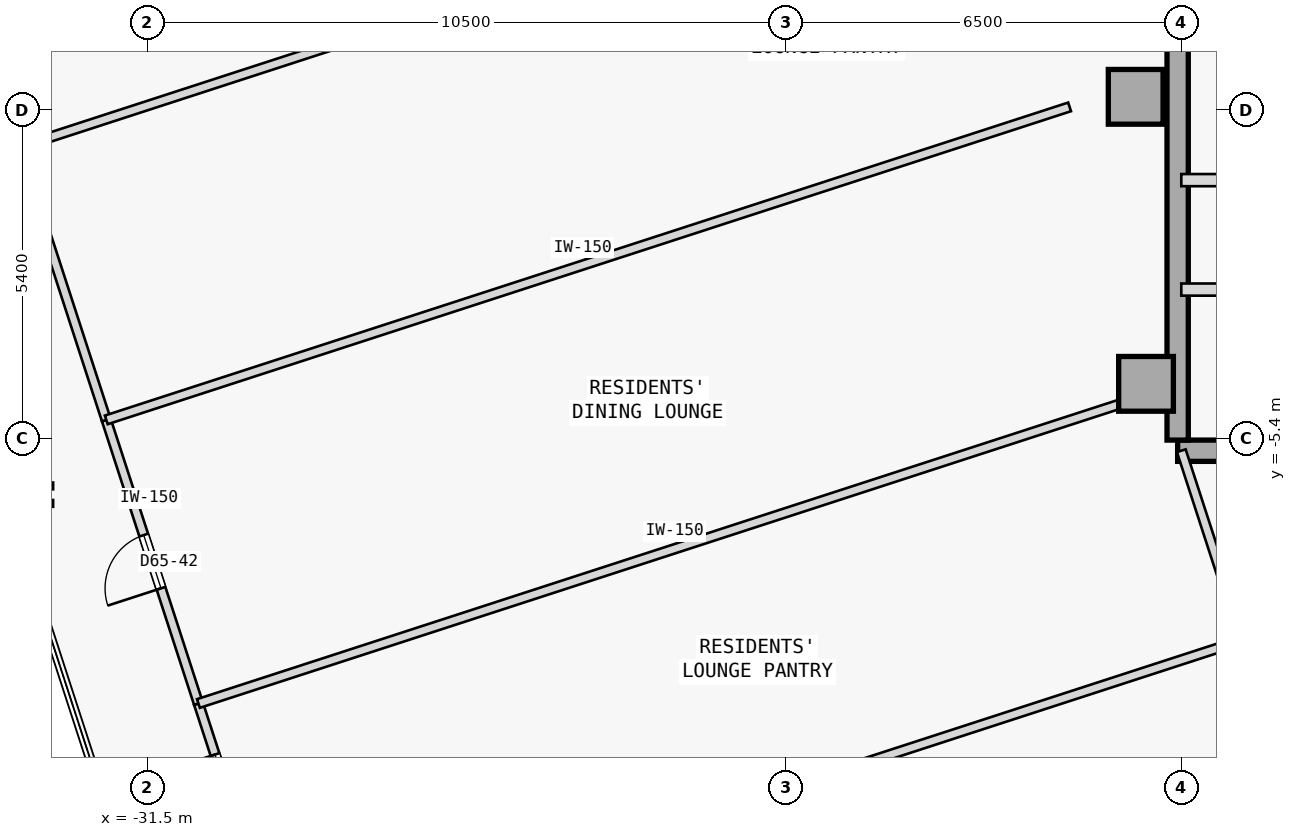
"""IFC4 building model, lengths in metres.
Left out: names, types, materials, properties, quantities, classifications, styles, units other than length and angle.
Written with IfcOpenShell. Run it as: python <this file> out.ifc"""

import sys

from ifc_helpers import new_model, si_unit, direction, frame, frame_2d, origin, origin_2d, place, context, subcontext, project, spatial, rectangle, extrude, element, fill, save


model = new_model("IFC4")
c1 = context("Model", 3, precision=1e-05, world=origin(), true_north=direction((0.0, 1.0)))
c2 = subcontext(c1, "Body", "Model", "MODEL_VIEW")
j1 = project(units=[si_unit("LENGTHUNIT", "METRE"), si_unit("PLANEANGLEUNIT", "RADIAN")], contexts=[c1])
p1 = place(None, origin())
s1 = spatial("IfcSite", under=j1, at=p1, CompositionType="ELEMENT")
p2 = place(p1, origin())
s2 = spatial("IfcBuilding", under=s1, at=p2, CompositionType="ELEMENT")
p3 = place(p2, frame((0.0, 0.0, 244.4)))
s3 = spatial("IfcBuildingStorey", under=s2, at=p3, CompositionType="ELEMENT", Elevation=244.4)
for number, where, z_axis, x_axis in (
    (1, (-15.25, 0.22, 0.0), (0.0, 0.0, 1.0), (1.0, 0.0, 0.0)),
    (2, (-15.08, -4.5, 0.0), (0.0, 0.0, 1.0), (1.0, 0.0, 0.0)),
):
    element("IfcColumn", number, at=place(p3, frame(where, z_axis=z_axis, x_axis=x_axis)), inside=s3, PredefinedType="COLUMN", context=c2, shape_type="SweptSolid", body=[
        extrude(rectangle(XDim=0.9, YDim=0.9, at=origin_2d()), origin(), (0.0, 0.0, 1.0), 3.35),
    ])
p4 = place(p3, frame((-14.56, -5.6, 0.0), z_axis=(0.0, 0.0, 1.0), x_axis=(1.0, 0.0, 0.0)))
e3 = element("IfcWall", 3, at=p4, inside=s3, PredefinedType="SHEAR", context=c2, shape_type="SweptSolid", body=[
    extrude(rectangle(XDim=10.86, YDim=0.35, at=frame_2d((5.43, 0.0))), origin(), (0.0, 0.0, 1.0), 3.125),
])
p5 = place(p3, frame((-14.56, -5.425, 0.0), z_axis=(0.0, 0.0, 1.0), x_axis=(0.0, 1.0, 0.0)))
e4 = element("IfcWall", 4, at=p5, inside=s3, PredefinedType="SHEAR", context=c2, shape_type="SweptSolid", body=[
    extrude(rectangle(XDim=10.85, YDim=0.35, at=frame_2d((5.425, 0.0))), origin(), (0.0, 0.0, 1.0), 3.125),
])
p6 = place(p3, frame((-14.5, -1.15, 0.0), z_axis=(0.0, 0.0, 1.0), x_axis=(1.0, 0.0, 0.0)))
e5 = element("IfcWall", 5, at=p6, inside=s3, PredefinedType="STANDARD", context=c2, shape_type="SweptSolid", body=[
    extrude(rectangle(XDim=2.95, YDim=0.2, at=frame_2d((1.475, 0.0))), origin(), (0.0, 0.0, 1.0), 3.125),
])
p7 = place(p6, frame((0.75, 0.0, 0.0)))
e6 = element("IfcOpeningElement", 6, at=p7, cuts=e5, PredefinedType="OPENING", context=c2, shape_type="SweptSolid", body=[
    extrude(rectangle(XDim=1.05, YDim=2.18, at=frame_2d((0.525, 1.09))), frame((0.0, 0.11, 0.0), z_axis=(0.0, -1.0, 0.0), x_axis=(1.0, 0.0, 0.0)), (0.0, 0.0, 1.0), 0.22),
])
p8 = place(p3, frame((-14.5, -2.95, 0.0), z_axis=(0.0, 0.0, 1.0), x_axis=(1.0, 0.0, 0.0)))
e7 = element("IfcWall", 7, at=p8, inside=s3, PredefinedType="STANDARD", context=c2, shape_type="SweptSolid", body=[
    extrude(rectangle(XDim=10.8, YDim=0.2, at=frame_2d((5.4, 0.0))), origin(), (0.0, 0.0, 1.0), 3.125),
])
p9 = place(p8, frame((9.17, 0.0, 0.0)))
e8 = element("IfcOpeningElement", 8, at=p9, cuts=e7, PredefinedType="OPENING", context=c2, shape_type="SweptSolid", body=[
    extrude(rectangle(XDim=1.1, YDim=2.15, at=frame_2d((0.55, 1.075))), frame((0.0, 0.11, 0.0), z_axis=(0.0, -1.0, 0.0), x_axis=(1.0, 0.0, 0.0)), (0.0, 0.0, 1.0), 0.22),
])
p10 = place(p8, frame((2.33, 0.0, 0.0)))
e9 = element("IfcOpeningElement", 9, at=p10, cuts=e7, PredefinedType="OPENING", context=c2, shape_type="SweptSolid", body=[
    extrude(rectangle(XDim=0.92, YDim=2.15, at=frame_2d((0.46, 1.075))), frame((0.0, 0.11, 0.0), z_axis=(0.0, -1.0, 0.0), x_axis=(1.0, 0.0, 0.0)), (0.0, 0.0, 1.0), 0.22),
])
p11 = place(p8, frame((6.65, 0.0, 0.0)))
e10 = element("IfcOpeningElement", 10, at=p11, cuts=e7, PredefinedType="OPENING", context=c2, shape_type="SweptSolid", body=[
    extrude(rectangle(XDim=0.92, YDim=2.15, at=frame_2d((0.46, 1.075))), frame((0.0, 0.11, 0.0), z_axis=(0.0, -1.0, 0.0), x_axis=(1.0, 0.0, 0.0)), (0.0, 0.0, 1.0), 0.22),
])
p12 = place(p3, frame((-36.012, 0.314, 0.0), z_axis=(0.0, 0.0, 1.0), x_axis=(0.951071182868, 0.308971851659, 0.0)))
e11 = element("IfcWall", 11, at=p12, inside=s3, PredefinedType="PARTITIONING", context=c2, shape_type="SweptSolid", body=[
    extrude(rectangle(XDim=3.77, YDim=0.15, at=frame_2d((1.885, 0.0))), origin(), (0.0, 0.0, 1.0), 3.125),
])
p13 = place(p3, frame((-29.833, -12.311, 0.0), z_axis=(0.0, 0.0, 1.0), x_axis=(-0.309044953986, 0.951047431213, 0.0)))
e12 = element("IfcWall", 12, at=p13, inside=s3, PredefinedType="PARTITIONING", context=c2, shape_type="SweptSolid", body=[
    extrude(rectangle(XDim=2.685, YDim=0.15, at=frame_2d((1.343, 0.0))), origin(), (0.0, 0.0, 1.0), 3.125),
])
p14 = place(p13, frame((0.883, 0.0, 0.0)))
e13 = element("IfcOpeningElement", 13, at=p14, cuts=e12, PredefinedType="OPENING", context=c2, shape_type="SweptSolid", body=[
    extrude(rectangle(XDim=0.92, YDim=2.15, at=frame_2d((0.46, 1.075))), frame((0.0, 0.085, 0.0), z_axis=(0.0, -1.0, 0.0), x_axis=(1.0, 0.0, 0.0)), (0.0, 0.0, 1.0), 0.17),
])
p15 = place(p3, frame((-30.663, -9.757, 0.0), z_axis=(0.0, 0.0, 1.0), x_axis=(-0.309019653166, 0.951055652397, 0.0)))
e14 = element("IfcWall", 14, at=p15, inside=s3, PredefinedType="PARTITIONING", context=c2, shape_type="SweptSolid", body=[
    extrude(rectangle(XDim=4.904, YDim=0.15, at=frame_2d((2.452, 0.0))), origin(), (0.0, 0.0, 1.0), 3.125),
])
p16 = place(p15, frame((1.992, 0.0, 0.0)))
e15 = element("IfcOpeningElement", 15, at=p16, cuts=e14, PredefinedType="OPENING", context=c2, shape_type="SweptSolid", body=[
    extrude(rectangle(XDim=0.92, YDim=2.15, at=frame_2d((0.46, 1.075))), frame((0.0, 0.085, 0.0), z_axis=(0.0, -1.0, 0.0), x_axis=(1.0, 0.0, 0.0)), (0.0, 0.0, 1.0), 0.17),
])
p17 = place(p3, frame((-32.179, -5.093, 0.0), z_axis=(0.0, 0.0, 1.0), x_axis=(-0.309014532869, 0.951057316083, 0.0)))
e16 = element("IfcWall", 16, at=p17, inside=s3, PredefinedType="PARTITIONING", context=c2, shape_type="SweptSolid", body=[
    extrude(rectangle(XDim=4.707, YDim=0.15, at=frame_2d((2.354, 0.0))), origin(), (0.0, 0.0, 1.0), 3.125),
])
p18 = place(p3, frame((-33.633, -0.616, 0.0), z_axis=(0.0, 0.0, 1.0), x_axis=(0.951058192995, 0.309011833974, 0.0)))
e17 = element("IfcWall", 17, at=p18, inside=s3, PredefinedType="PARTITIONING", context=c2, shape_type="SweptSolid", body=[
    extrude(rectangle(XDim=16.657, YDim=0.15, at=frame_2d((8.329, 0.0))), origin(), (0.0, 0.0, 1.0), 3.125),
])
p19 = place(p18, frame((7.868, 0.0, 0.0)))
e18 = element("IfcOpeningElement", 18, at=p19, cuts=e17, PredefinedType="OPENING", context=c2, shape_type="SweptSolid", body=[
    extrude(rectangle(XDim=0.92, YDim=2.15, at=frame_2d((0.46, 1.075))), frame((0.0, 0.085, 0.0), z_axis=(0.0, -1.0, 0.0), x_axis=(1.0, 0.0, 0.0)), (0.0, 0.0, 1.0), 0.17),
])
p20 = place(p3, frame((-31.208, -14.471, 0.0), z_axis=(0.0, 0.0, 1.0), x_axis=(0.951057753948, 0.309013185244, 0.0)))
e19 = element("IfcWall", 19, at=p20, inside=s3, PredefinedType="PARTITIONING", context=c2, shape_type="SweptSolid", body=[
    extrude(rectangle(XDim=18.632, YDim=0.15, at=frame_2d((9.316, 0.0))), origin(), (0.0, 0.0, 1.0), 3.125),
])
p21 = place(p3, frame((-30.663, -9.757, 0.0), z_axis=(0.0, 0.0, 1.0), x_axis=(0.951058192995, 0.309011833974, 0.0)))
e20 = element("IfcWall", 20, at=p21, inside=s3, PredefinedType="PARTITIONING", context=c2, shape_type="SweptSolid", body=[
    extrude(rectangle(XDim=16.657, YDim=0.15, at=frame_2d((8.329, 0.0))), origin(), (0.0, 0.0, 1.0), 3.125),
])
p22 = place(p3, frame((-13.488, -8.713, 0.0), z_axis=(0.0, 0.0, 1.0), x_axis=(-0.309082700143, 0.951035164687, 0.0)))
e21 = element("IfcWall", 21, at=p22, inside=s3, PredefinedType="PARTITIONING", context=c2, shape_type="SweptSolid", body=[
    extrude(rectangle(XDim=3.274, YDim=0.15, at=frame_2d((1.637, 0.0))), origin(), (0.0, 0.0, 1.0), 3.125),
])
p23 = place(p3, frame((-32.179, -5.093, 0.0), z_axis=(0.0, 0.0, 1.0), x_axis=(0.951053885426, 0.309025091239, 0.0)))
e22 = element("IfcWall", 22, at=p23, inside=s3, PredefinedType="PARTITIONING", context=c2, shape_type="SweptSolid", body=[
    extrude(rectangle(XDim=16.657, YDim=0.15, at=frame_2d((8.329, 0.0))), origin(), (0.0, 0.0, 1.0), 3.125),
])
p24 = place(p14, origin())
e23 = element("IfcDoor", 23, at=p24, inside=s3, OperationType="SINGLE_SWING_RIGHT", PredefinedType="DOOR", context=c2, shape_type="SweptSolid", body=[
    extrude(rectangle(XDim=0.92, YDim=2.15, at=frame_2d((0.46, 1.075))), frame((0.0, 0.025, 0.0), z_axis=(0.0, -1.0, 0.0), x_axis=(1.0, 0.0, 0.0)), (0.0, 0.0, 1.0), 0.05),
])
fill(e13, e23)
p25 = place(p16, origin())
e24 = element("IfcDoor", 24, at=p25, inside=s3, OperationType="SINGLE_SWING_LEFT", PredefinedType="DOOR", context=c2, shape_type="SweptSolid", body=[
    extrude(rectangle(XDim=0.92, YDim=2.15, at=frame_2d((0.46, 1.075))), frame((0.0, 0.025, 0.0), z_axis=(0.0, -1.0, 0.0), x_axis=(1.0, 0.0, 0.0)), (0.0, 0.0, 1.0), 0.05),
])
fill(e15, e24)
save(model, sys.argv[1])
